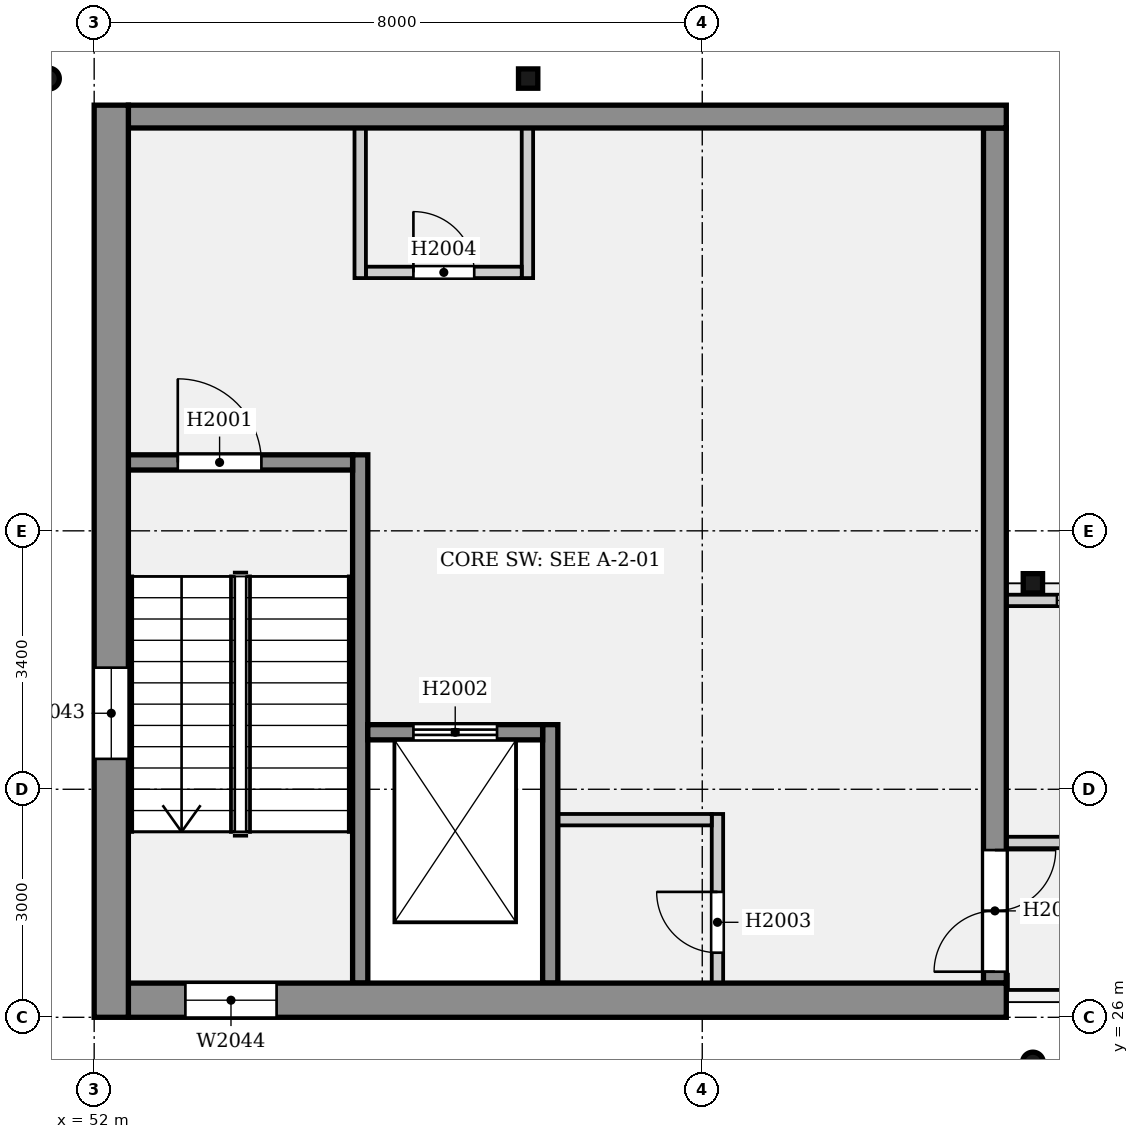
"""IFC4 building model, lengths in metres.
Left out: names, types, materials, properties, quantities, classifications, styles, units other than length and angle.
Written with IfcOpenShell. Run it as: python <this file> out.ifc"""

import sys

from ifc_helpers import new_model, si_unit, direction, frame, frame_2d, origin, origin_2d, place, context, subcontext, project, spatial, rectangle, hollow_rectangle, hollow_circle, extrude, element, fill, save


model = new_model("IFC4")
c1 = context("Model", 3, precision=1e-05, world=origin(), true_north=direction((0.0, 1.0)))
c2 = subcontext(c1, "Body", "Model", "MODEL_VIEW")
j1 = project(units=[si_unit("LENGTHUNIT", "METRE"), si_unit("PLANEANGLEUNIT", "RADIAN")], contexts=[c1])
p1 = place(None, origin())
s1 = spatial("IfcSite", under=j1, at=p1, CompositionType="ELEMENT")
p2 = place(p1, origin())
s2 = spatial("IfcBuilding", under=s1, at=p2, CompositionType="ELEMENT")
p3 = place(p2, frame((0.0, 0.0, 9.4)))
s3 = spatial("IfcBuildingStorey", under=s2, at=p3, CompositionType="ELEMENT", Elevation=9.4)
p4 = place(p3, frame((52.225, 26.0, 0.0), z_axis=(0.0, 0.0, 1.0), x_axis=(0.0, 1.0, 0.0)))
e1 = element("IfcWall", 1, at=p4, inside=s3, PredefinedType="ELEMENTEDWALL", context=c2, shape_type="SweptSolid", body=[
    extrude(rectangle(XDim=12.0, YDim=0.45, at=frame_2d((6.0, 0.0))), origin(), (0.0, 0.0, 1.0), 4.4),
])
p5 = place(p4, frame((3.4, 0.0, 0.6)))
e2 = element("IfcOpeningElement", 2, at=p5, cuts=e1, PredefinedType="OPENING", context=c2, shape_type="SweptSolid", body=[
    extrude(rectangle(XDim=1.2, YDim=3.0, at=frame_2d((0.6, 1.5))), frame((0.0, 0.235, 0.0), z_axis=(0.0, -1.0, 0.0), x_axis=(1.0, 0.0, 0.0)), (0.0, 0.0, 1.0), 0.47),
])
p6 = place(p3, frame((52.45, 26.225, 0.0), z_axis=(0.0, 0.0, 1.0), x_axis=(1.0, 0.0, 0.0)))
e3 = element("IfcWall", 3, at=p6, inside=s3, PredefinedType="ELEMENTEDWALL", context=c2, shape_type="SweptSolid", body=[
    extrude(rectangle(XDim=11.55, YDim=0.45, at=frame_2d((5.775, 0.0))), origin(), (0.0, 0.0, 1.0), 4.4),
])
p7 = place(p6, frame((0.75, 0.0, 0.6)))
e4 = element("IfcOpeningElement", 4, at=p7, cuts=e3, PredefinedType="OPENING", context=c2, shape_type="SweptSolid", body=[
    extrude(rectangle(XDim=1.2, YDim=3.0, at=frame_2d((0.6, 1.5))), frame((0.0, 0.235, 0.0), z_axis=(0.0, -1.0, 0.0), x_axis=(1.0, 0.0, 0.0)), (0.0, 0.0, 1.0), 0.47),
])
p8 = place(p3, frame((63.85, 26.45, 0.0), z_axis=(0.0, 0.0, 1.0), x_axis=(0.0, 1.0, 0.0)))
e5 = element("IfcWall", 5, at=p8, inside=s3, PredefinedType="SOLIDWALL", context=c2, shape_type="SweptSolid", body=[
    extrude(rectangle(XDim=11.25, YDim=0.3, at=frame_2d((5.625, 0.0))), origin(), (0.0, 0.0, 1.0), 4.4),
])
p9 = place(p8, frame((0.15, 0.0, 0.0)))
e6 = element("IfcOpeningElement", 6, at=p9, cuts=e5, PredefinedType="OPENING", context=c2, shape_type="SweptSolid", body=[
    extrude(rectangle(XDim=1.6, YDim=2.1, at=frame_2d((0.8, 1.05))), frame((0.0, 0.16, 0.0), z_axis=(0.0, -1.0, 0.0), x_axis=(1.0, 0.0, 0.0)), (0.0, 0.0, 1.0), 0.32),
])
p10 = place(p3, frame((52.45, 37.85, 0.0), z_axis=(0.0, 0.0, 1.0), x_axis=(1.0, 0.0, 0.0)))
e7 = element("IfcWall", 7, at=p10, inside=s3, PredefinedType="SOLIDWALL", context=c2, shape_type="SweptSolid", body=[
    extrude(rectangle(XDim=11.55, YDim=0.3, at=frame_2d((5.775, 0.0))), origin(), (0.0, 0.0, 1.0), 4.4),
])
p11 = place(p3, frame((64.35, 25.405, 0.0), z_axis=(0.0, -0.19937762145, 0.979922733722), x_axis=(1.0, 0.0, 0.0)))
e8 = element("IfcColumn", 8, at=p11, inside=s3, PredefinedType="COLUMN", context=c2, shape_type="SweptSolid", body=[
    extrude(hollow_circle(Radius=0.136, WallThickness=0.013, at=origin_2d()), origin(), (0.0, 0.0, 1.0), 3.54),
])
p12 = place(p3, frame((64.35, 31.71, 0.0), z_axis=(0.0, 0.0, 1.0), x_axis=(1.0, 0.0, 0.0)))
e9 = element("IfcColumn", 9, at=p12, inside=s3, PredefinedType="COLUMN", context=c2, shape_type="SweptSolid", body=[
    extrude(hollow_rectangle(XDim=0.254, YDim=0.254, WallThickness=0.016, InnerFilletRadius=0.008, OuterFilletRadius=0.024, at=origin_2d()), origin(), (0.0, 0.0, 1.0), 3.496),
])
p13 = place(p3, frame((51.405, 38.35, 0.0), z_axis=(-0.19937762145, 0.0, 0.979922733722), x_axis=(0.0, -1.0, 0.0)))
e10 = element("IfcColumn", 10, at=p13, inside=s3, PredefinedType="COLUMN", context=c2, shape_type="SweptSolid", body=[
    extrude(hollow_circle(Radius=0.136, WallThickness=0.013, at=origin_2d()), origin(), (0.0, 0.0, 1.0), 3.54),
])
p14 = place(p3, frame((57.71, 38.35, 0.0), z_axis=(0.0, 0.0, 1.0), x_axis=(1.0, 0.0, 0.0)))
e11 = element("IfcColumn", 11, at=p14, inside=s3, PredefinedType="COLUMN", context=c2, shape_type="SweptSolid", body=[
    extrude(hollow_rectangle(XDim=0.254, YDim=0.254, WallThickness=0.016, InnerFilletRadius=0.008, OuterFilletRadius=0.024, at=origin_2d()), origin(), (0.0, 0.0, 1.0), 3.496),
])
p15 = place(p3, frame((55.5, 26.45, 0.0), z_axis=(0.0, 0.0, 1.0), x_axis=(0.0, 1.0, 0.0)))
e12 = element("IfcWall", 12, at=p15, inside=s3, PredefinedType="SOLIDWALL", context=c2, shape_type="SweptSolid", body=[
    extrude(rectangle(XDim=6.95, YDim=0.2, at=frame_2d((3.475, 0.0))), origin(), (0.0, 0.0, 1.0), 4.4),
])
p16 = place(p3, frame((52.45, 33.3, 0.0), z_axis=(0.0, 0.0, 1.0), x_axis=(1.0, 0.0, 0.0)))
e13 = element("IfcWall", 13, at=p16, inside=s3, PredefinedType="SOLIDWALL", context=c2, shape_type="SweptSolid", body=[
    extrude(rectangle(XDim=2.95, YDim=0.2, at=frame_2d((1.475, 0.0))), origin(), (0.0, 0.0, 1.0), 4.4),
])
p17 = place(p16, frame((0.65, 0.0, 0.0)))
e14 = element("IfcOpeningElement", 14, at=p17, cuts=e13, PredefinedType="OPENING", context=c2, shape_type="SweptSolid", body=[
    extrude(rectangle(XDim=1.1, YDim=2.1, at=frame_2d((0.55, 1.05))), frame((0.0, 0.11, 0.0), z_axis=(0.0, -1.0, 0.0), x_axis=(1.0, 0.0, 0.0)), (0.0, 0.0, 1.0), 0.22),
])
p18 = place(p3, frame((58.0, 26.45, 0.0), z_axis=(0.0, 0.0, 1.0), x_axis=(0.0, 1.0, 0.0)))
e15 = element("IfcWall", 15, at=p18, inside=s3, PredefinedType="SOLIDWALL", context=c2, shape_type="SweptSolid", body=[
    extrude(rectangle(XDim=3.4, YDim=0.2, at=frame_2d((1.7, 0.0))), origin(), (0.0, 0.0, 1.0), 4.4),
])
p19 = place(p3, frame((55.6, 29.75, 0.0), z_axis=(0.0, 0.0, 1.0), x_axis=(1.0, 0.0, 0.0)))
e16 = element("IfcWall", 16, at=p19, inside=s3, PredefinedType="SOLIDWALL", context=c2, shape_type="SweptSolid", body=[
    extrude(rectangle(XDim=2.3, YDim=0.2, at=frame_2d((1.15, 0.0))), origin(), (0.0, 0.0, 1.0), 4.4),
])
p20 = place(p19, frame((0.6, 0.0, 0.0)))
e17 = element("IfcOpeningElement", 17, at=p20, cuts=e16, PredefinedType="OPENING", context=c2, shape_type="SweptSolid", body=[
    extrude(rectangle(XDim=1.1, YDim=2.1, at=frame_2d((0.55, 1.05))), frame((0.0, 0.11, 0.0), z_axis=(0.0, -1.0, 0.0), x_axis=(1.0, 0.0, 0.0)), (0.0, 0.0, 1.0), 0.22),
])
p21 = place(p3, frame((58.1, 28.6, 0.0), z_axis=(0.0, 0.0, 1.0), x_axis=(1.0, 0.0, 0.0)))
e18 = element("IfcWall", 18, at=p21, inside=s3, PredefinedType="PARTITIONING", context=c2, shape_type="SweptSolid", body=[
    extrude(rectangle(XDim=2.025, YDim=0.15, at=frame_2d((1.012, 0.0))), origin(), (0.0, 0.0, 1.0), 4.15),
])
p22 = place(p3, frame((60.2, 26.45, 0.0), z_axis=(0.0, 0.0, 1.0), x_axis=(0.0, 1.0, 0.0)))
e19 = element("IfcWall", 19, at=p22, inside=s3, PredefinedType="PARTITIONING", context=c2, shape_type="SweptSolid", body=[
    extrude(rectangle(XDim=2.225, YDim=0.15, at=frame_2d((1.113, 0.0))), origin(), (0.0, 0.0, 1.0), 4.15),
])
p23 = place(p22, frame((0.4, 0.0, 0.0)))
e20 = element("IfcOpeningElement", 20, at=p23, cuts=e19, PredefinedType="OPENING", context=c2, shape_type="SweptSolid", body=[
    extrude(rectangle(XDim=0.8, YDim=2.1, at=frame_2d((0.4, 1.05))), frame((0.0, 0.085, 0.0), z_axis=(0.0, -1.0, 0.0), x_axis=(1.0, 0.0, 0.0)), (0.0, 0.0, 1.0), 0.17),
])
p24 = place(p3, frame((55.575, 35.8, 0.0), z_axis=(0.0, 0.0, 1.0), x_axis=(1.0, 0.0, 0.0)))
e21 = element("IfcWall", 21, at=p24, inside=s3, PredefinedType="PARTITIONING", context=c2, shape_type="SweptSolid", body=[
    extrude(rectangle(XDim=2.05, YDim=0.15, at=frame_2d((1.025, 0.0))), origin(), (0.0, 0.0, 1.0), 4.15),
])
p25 = place(p24, frame((0.625, 0.0, 0.0)))
e22 = element("IfcOpeningElement", 22, at=p25, cuts=e21, PredefinedType="OPENING", context=c2, shape_type="SweptSolid", body=[
    extrude(rectangle(XDim=0.8, YDim=2.1, at=frame_2d((0.4, 1.05))), frame((0.0, 0.085, 0.0), z_axis=(0.0, -1.0, 0.0), x_axis=(1.0, 0.0, 0.0)), (0.0, 0.0, 1.0), 0.17),
])
for number, where, z_axis, x_axis in (
    (23, (55.5, 35.725, 0.0), (0.0, 0.0, 1.0), (0.0, 1.0, 0.0)),
    (24, (57.7, 35.725, 0.0), (0.0, 0.0, 1.0), (0.0, 1.0, 0.0)),
):
    element("IfcWall", number, at=place(p3, frame(where, z_axis=z_axis, x_axis=x_axis)), inside=s3, PredefinedType="PARTITIONING", context=c2, shape_type="SweptSolid", body=[
        extrude(rectangle(XDim=1.975, YDim=0.15, at=frame_2d((0.987, 0.0))), origin(), (0.0, 0.0, 1.0), 4.15),
    ])
p26 = place(p3, frame((64.0, 28.3, 0.0), z_axis=(0.0, 0.0, 1.0), x_axis=(1.0, 0.0, 0.0)))
e25 = element("IfcWall", 25, at=p26, inside=s3, PredefinedType="PARTITIONING", context=c2, shape_type="SweptSolid", body=[
    extrude(rectangle(XDim=15.925, YDim=0.15, at=frame_2d((7.962, 0.0))), origin(), (0.0, 0.0, 1.0), 3.496),
])
p27 = place(p26, frame((7.1, 0.0, 0.0)))
e26 = element("IfcOpeningElement", 26, at=p27, cuts=e25, PredefinedType="OPENING", context=c2, shape_type="SweptSolid", body=[
    extrude(rectangle(XDim=1.8, YDim=2.1, at=frame_2d((0.9, 1.05))), frame((0.0, 0.085, 0.0), z_axis=(0.0, -1.0, 0.0), x_axis=(1.0, 0.0, 0.0)), (0.0, 0.0, 1.0), 0.17),
])
p28 = place(p3, frame((64.0, 31.485, 0.0), z_axis=(0.0, 0.0, 1.0), x_axis=(1.0, 0.0, 0.0)))
e27 = element("IfcWall", 27, at=p28, inside=s3, PredefinedType="PARTITIONING", context=c2, shape_type="SweptSolid", body=[
    extrude(rectangle(XDim=16.0, YDim=0.15, at=frame_2d((8.0, 0.0))), origin(), (0.0, 0.0, 1.0), 3.496),
])
p29 = place(p28, frame((0.667, 0.0, 1.0)))
e28 = element("IfcOpeningElement", 28, at=p29, cuts=e27, PredefinedType="OPENING", context=c2, shape_type="SweptSolid", body=[
    extrude(rectangle(XDim=2.4, YDim=1.5, at=frame_2d((1.2, 0.75))), frame((0.0, 0.085, 0.0), z_axis=(0.0, -1.0, 0.0), x_axis=(1.0, 0.0, 0.0)), (0.0, 0.0, 1.0), 0.17),
])
p30 = place(p28, frame((3.733, 0.0, 1.0)))
e29 = element("IfcOpeningElement", 29, at=p30, cuts=e27, PredefinedType="OPENING", context=c2, shape_type="SweptSolid", body=[
    extrude(rectangle(XDim=2.4, YDim=1.5, at=frame_2d((1.2, 0.75))), frame((0.0, 0.085, 0.0), z_axis=(0.0, -1.0, 0.0), x_axis=(1.0, 0.0, 0.0)), (0.0, 0.0, 1.0), 0.17),
])
p31 = place(p28, frame((6.8, 0.0, 1.0)))
e30 = element("IfcOpeningElement", 30, at=p31, cuts=e27, PredefinedType="OPENING", context=c2, shape_type="SweptSolid", body=[
    extrude(rectangle(XDim=2.4, YDim=1.5, at=frame_2d((1.2, 0.75))), frame((0.0, 0.085, 0.0), z_axis=(0.0, -1.0, 0.0), x_axis=(1.0, 0.0, 0.0)), (0.0, 0.0, 1.0), 0.17),
])
p32 = place(p28, frame((9.867, 0.0, 1.0)))
e31 = element("IfcOpeningElement", 31, at=p32, cuts=e27, PredefinedType="OPENING", context=c2, shape_type="SweptSolid", body=[
    extrude(rectangle(XDim=2.4, YDim=1.5, at=frame_2d((1.2, 0.75))), frame((0.0, 0.085, 0.0), z_axis=(0.0, -1.0, 0.0), x_axis=(1.0, 0.0, 0.0)), (0.0, 0.0, 1.0), 0.17),
])
p33 = place(p28, frame((12.933, 0.0, 1.0)))
e32 = element("IfcOpeningElement", 32, at=p33, cuts=e27, PredefinedType="OPENING", context=c2, shape_type="SweptSolid", body=[
    extrude(rectangle(XDim=2.4, YDim=1.5, at=frame_2d((1.2, 0.75))), frame((0.0, 0.085, 0.0), z_axis=(0.0, -1.0, 0.0), x_axis=(1.0, 0.0, 0.0)), (0.0, 0.0, 1.0), 0.17),
])
p34 = place(p17, origin())
e33 = element("IfcDoor", 33, at=p34, inside=s3, OperationType="SINGLE_SWING_LEFT", PredefinedType="DOOR", context=c2, shape_type="SweptSolid", body=[
    extrude(rectangle(XDim=1.1, YDim=2.1, at=frame_2d((0.55, 1.05))), frame((0.0, 0.025, 0.0), z_axis=(0.0, -1.0, 0.0), x_axis=(1.0, 0.0, 0.0)), (0.0, 0.0, 1.0), 0.05),
])
fill(e14, e33)
p35 = place(p20, origin())
e34 = element("IfcDoor", 34, at=p35, inside=s3, OperationType="DOUBLE_DOOR_SLIDING", PredefinedType="DOOR", context=c2, shape_type="SweptSolid", body=[
    extrude(rectangle(XDim=1.1, YDim=2.1, at=frame_2d((0.55, 1.05))), frame((0.0, 0.025, 0.0), z_axis=(0.0, -1.0, 0.0), x_axis=(1.0, 0.0, 0.0)), (0.0, 0.0, 1.0), 0.05),
])
fill(e17, e34)
p36 = place(p23, origin())
e35 = element("IfcDoor", 35, at=p36, inside=s3, OperationType="SINGLE_SWING_RIGHT", PredefinedType="DOOR", context=c2, shape_type="SweptSolid", body=[
    extrude(rectangle(XDim=0.8, YDim=2.1, at=frame_2d((0.4, 1.05))), frame((0.0, 0.025, 0.0), z_axis=(0.0, -1.0, 0.0), x_axis=(1.0, 0.0, 0.0)), (0.0, 0.0, 1.0), 0.05),
])
fill(e20, e35)
p37 = place(p25, origin())
e36 = element("IfcDoor", 36, at=p37, inside=s3, OperationType="SINGLE_SWING_LEFT", PredefinedType="DOOR", context=c2, shape_type="SweptSolid", body=[
    extrude(rectangle(XDim=0.8, YDim=2.1, at=frame_2d((0.4, 1.05))), frame((0.0, 0.025, 0.0), z_axis=(0.0, -1.0, 0.0), x_axis=(1.0, 0.0, 0.0)), (0.0, 0.0, 1.0), 0.05),
])
fill(e22, e36)
p38 = place(p9, origin())
e37 = element("IfcDoor", 37, at=p38, inside=s3, OperationType="DOUBLE_DOOR_SINGLE_SWING", PredefinedType="DOOR", context=c2, shape_type="SweptSolid", body=[
    extrude(rectangle(XDim=1.6, YDim=2.1, at=frame_2d((0.8, 1.05))), frame((0.0, 0.025, 0.0), z_axis=(0.0, -1.0, 0.0), x_axis=(1.0, 0.0, 0.0)), (0.0, 0.0, 1.0), 0.05),
])
fill(e6, e37)
p39 = place(p5, origin())
e38 = element("IfcWindow", 38, at=p39, inside=s3, PartitioningType="SINGLE_PANEL", PredefinedType="WINDOW", context=c2, shape_type="SweptSolid", body=[
    extrude(rectangle(XDim=1.2, YDim=3.0, at=frame_2d((0.6, 1.5))), frame((0.0, 0.03, 0.0), z_axis=(0.0, -1.0, 0.0), x_axis=(1.0, 0.0, 0.0)), (0.0, 0.0, 1.0), 0.06),
])
fill(e2, e38)
p40 = place(p7, origin())
e39 = element("IfcWindow", 39, at=p40, inside=s3, PartitioningType="SINGLE_PANEL", PredefinedType="WINDOW", context=c2, shape_type="SweptSolid", body=[
    extrude(rectangle(XDim=1.2, YDim=3.0, at=frame_2d((0.6, 1.5))), frame((0.0, 0.03, 0.0), z_axis=(0.0, -1.0, 0.0), x_axis=(1.0, 0.0, 0.0)), (0.0, 0.0, 1.0), 0.06),
])
fill(e4, e39)
p41 = place(p29, origin())
e40 = element("IfcWindow", 40, at=p41, inside=s3, PartitioningType="SINGLE_PANEL", PredefinedType="WINDOW", context=c2, shape_type="SweptSolid", body=[
    extrude(rectangle(XDim=2.4, YDim=1.5, at=frame_2d((1.2, 0.75))), frame((0.0, 0.03, 0.0), z_axis=(0.0, -1.0, 0.0), x_axis=(1.0, 0.0, 0.0)), (0.0, 0.0, 1.0), 0.06),
])
fill(e28, e40)
save(model, sys.argv[1])
